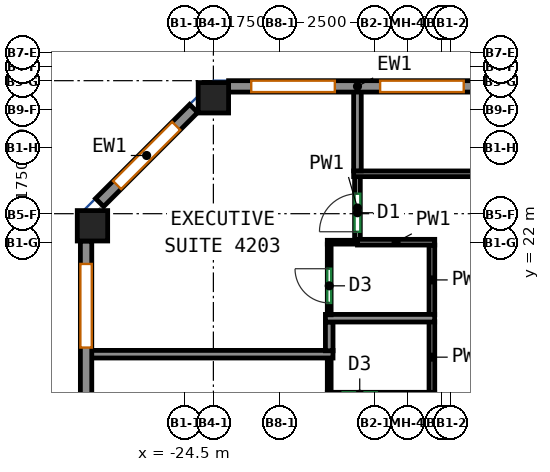
"""IFC4 building model, lengths in metres.
Left out: names, types, materials, properties, quantities, classifications, styles, units other than length and angle.
Written with IfcOpenShell. Run it as: python <this file> out.ifc"""

import sys

from ifc_helpers import new_model, si_unit, direction, frame, frame_2d, origin, origin_2d, place, context, subcontext, project, spatial, rectangle, extrude, source, transform, mapped, element, fill, save


model = new_model("IFC4")
c1 = context("Model", 3, precision=1e-05, world=origin(), true_north=direction((0.0, 1.0)))
c2 = subcontext(c1, "Body", "Model", "MODEL_VIEW")
j1 = project(units=[si_unit("LENGTHUNIT", "METRE"), si_unit("PLANEANGLEUNIT", "RADIAN")], contexts=[c1])
p1 = place(None, origin())
s1 = spatial("IfcSite", under=j1, at=p1, CompositionType="ELEMENT")
p2 = place(p1, origin())
s2 = spatial("IfcBuilding", under=s1, at=p2, CompositionType="ELEMENT")
p3 = place(p2, frame((0.0, 0.0, 178.7)))
s3 = spatial("IfcBuildingStorey", under=s2, at=p3, CompositionType="ELEMENT", Elevation=178.7)
m1 = source(origin(), c2, "Body", "SweptSolid", [
    extrude(rectangle(XDim=0.8, YDim=0.8, at=origin_2d()), origin(), (0.0, 0.0, 1.0), 3.12),
])
for number, where, z_axis, x_axis in (
    (1, (-26.932, 22.432, 0.0), (0.0, 0.0, 1.0), (1.0, 0.0, 0.0)),
    (2, (-23.75, 25.8, 0.0), (0.0, 0.0, 1.0), (1.0, 0.0, 0.0)),
):
    element("IfcColumn", number, at=place(p3, frame(where, z_axis=z_axis, x_axis=x_axis)), inside=s3, PredefinedType="COLUMN", context=c2, shape_type="MappedRepresentation", body=[
        mapped(m1, transform((0.0, 0.0, 0.0))),
    ])
m2 = source(origin(), c2, "Body", "SweptSolid", [
    extrude(rectangle(XDim=6.783, YDim=0.3, at=frame_2d((3.392, 0.0))), origin(), (0.0, 0.0, 1.0), 3.12),
])
p4 = place(p3, frame((-16.567, 26.1, 0.0), z_axis=(0.0, 0.0, 1.0), x_axis=(-1.0, 0.0, 0.0)))
e3 = element("IfcWall", 3, at=p4, inside=s3, PredefinedType="SOLIDWALL", context=c2, shape_type="MappedRepresentation", body=[
    mapped(m2, transform((0.0, 0.0, 0.0))),
])
p5 = place(p4, frame((0.596, 0.0, 0.85)))
e4 = element("IfcOpeningElement", 4, at=p5, cuts=e3, PredefinedType="OPENING", context=c2, shape_type="SweptSolid", body=[
    extrude(rectangle(XDim=2.2, YDim=1.95, at=frame_2d((1.1, 0.975))), frame((0.0, 0.16, 0.0), z_axis=(0.0, -1.0, 0.0), x_axis=(1.0, 0.0, 0.0)), (0.0, 0.0, 1.0), 0.32),
])
p6 = place(p4, frame((3.988, 0.0, 0.85)))
e5 = element("IfcOpeningElement", 5, at=p6, cuts=e3, PredefinedType="OPENING", context=c2, shape_type="SweptSolid", body=[
    extrude(rectangle(XDim=2.2, YDim=1.95, at=frame_2d((1.1, 0.975))), frame((0.0, 0.16, 0.0), z_axis=(0.0, -1.0, 0.0), x_axis=(1.0, 0.0, 0.0)), (0.0, 0.0, 1.0), 0.32),
])
m3 = source(origin(), c2, "Body", "SweptSolid", [
    extrude(rectangle(XDim=3.5, YDim=0.3, at=frame_2d((1.75, 0.0))), origin(), (0.0, 0.0, 1.0), 3.12),
])
p7 = place(p3, frame((-24.269, 25.519, 0.0), z_axis=(0.0, 0.0, 1.0), x_axis=(-0.707141656123, -0.70707190453, 0.0)))
e6 = element("IfcWall", 6, at=p7, inside=s3, PredefinedType="SOLIDWALL", context=c2, shape_type="MappedRepresentation", body=[
    mapped(m3, transform((0.0, 0.0, 0.0))),
])
p8 = place(p7, frame((0.65, 0.0, 0.85)))
e7 = element("IfcOpeningElement", 7, at=p8, cuts=e6, PredefinedType="OPENING", context=c2, shape_type="SweptSolid", body=[
    extrude(rectangle(XDim=2.2, YDim=1.95, at=frame_2d((1.1, 0.975))), frame((0.0, 0.16, 0.0), z_axis=(0.0, -1.0, 0.0), x_axis=(1.0, 0.0, 0.0)), (0.0, 0.0, 1.0), 0.32),
])
m4 = source(origin(), c2, "Body", "SweptSolid", [
    extrude(rectangle(XDim=13.632, YDim=0.3, at=frame_2d((6.816, 0.0))), origin(), (0.0, 0.0, 1.0), 3.12),
])
p9 = place(p3, frame((-27.1, 22.032, 0.0), z_axis=(0.0, 0.0, 1.0), x_axis=(0.0, -1.0, 0.0)))
e8 = element("IfcWall", 8, at=p9, inside=s3, PredefinedType="SOLIDWALL", context=c2, shape_type="MappedRepresentation", body=[
    mapped(m4, transform((0.0, 0.0, 0.0))),
])
p10 = place(p9, frame((0.604, 0.0, 0.85)))
e9 = element("IfcOpeningElement", 9, at=p10, cuts=e8, PredefinedType="OPENING", context=c2, shape_type="SweptSolid", body=[
    extrude(rectangle(XDim=2.2, YDim=1.95, at=frame_2d((1.1, 0.975))), frame((0.0, 0.16, 0.0), z_axis=(0.0, -1.0, 0.0), x_axis=(1.0, 0.0, 0.0)), (0.0, 0.0, 1.0), 0.32),
])
p11 = place(p9, frame((4.012, 0.0, 0.85)))
e10 = element("IfcOpeningElement", 10, at=p11, cuts=e8, PredefinedType="OPENING", context=c2, shape_type="SweptSolid", body=[
    extrude(rectangle(XDim=2.2, YDim=1.95, at=frame_2d((1.1, 0.975))), frame((0.0, 0.16, 0.0), z_axis=(0.0, -1.0, 0.0), x_axis=(1.0, 0.0, 0.0)), (0.0, 0.0, 1.0), 0.32),
])
p12 = place(p9, frame((7.42, 0.0, 0.85)))
e11 = element("IfcOpeningElement", 11, at=p12, cuts=e8, PredefinedType="OPENING", context=c2, shape_type="SweptSolid", body=[
    extrude(rectangle(XDim=2.2, YDim=1.95, at=frame_2d((1.1, 0.975))), frame((0.0, 0.16, 0.0), z_axis=(0.0, -1.0, 0.0), x_axis=(1.0, 0.0, 0.0)), (0.0, 0.0, 1.0), 0.32),
])
p13 = place(p9, frame((10.828, 0.0, 0.85)))
e12 = element("IfcOpeningElement", 12, at=p13, cuts=e8, PredefinedType="OPENING", context=c2, shape_type="SweptSolid", body=[
    extrude(rectangle(XDim=2.2, YDim=1.95, at=frame_2d((1.1, 0.975))), frame((0.0, 0.16, 0.0), z_axis=(0.0, -1.0, 0.0), x_axis=(1.0, 0.0, 0.0)), (0.0, 0.0, 1.0), 0.32),
])
p14 = place(p3, frame((-18.0, 18.04, 0.0), z_axis=(0.0, 0.0, 1.0), x_axis=(0.0, 1.0, 0.0)))
e13 = element("IfcWall", 13, at=p14, inside=s3, PredefinedType="PARTITIONING", context=c2, shape_type="SweptSolid", body=[
    extrude(rectangle(XDim=1.87, YDim=0.15, at=frame_2d((0.935, 0.0))), origin(), (0.0, 0.0, 1.0), 3.12),
])
p15 = place(p3, frame((-19.959, 22.075, 0.0), z_axis=(0.0, 0.0, 1.0), x_axis=(0.0, 1.0, 0.0)))
e14 = element("IfcWall", 14, at=p15, inside=s3, PredefinedType="PARTITIONING", context=c2, shape_type="SweptSolid", body=[
    extrude(rectangle(XDim=1.65, YDim=0.15, at=frame_2d((0.825, 0.0))), origin(), (0.0, 0.0, 1.0), 3.12),
])
p16 = place(p15, frame((0.2, 0.0, 0.0)))
e15 = element("IfcOpeningElement", 15, at=p16, cuts=e14, PredefinedType="OPENING", context=c2, shape_type="SweptSolid", body=[
    extrude(rectangle(XDim=1.0, YDim=2.1, at=frame_2d((0.5, 1.05))), frame((0.0, 0.085, 0.0), z_axis=(0.0, -1.0, 0.0), x_axis=(1.0, 0.0, 0.0)), (0.0, 0.0, 1.0), 0.17),
])
p17 = place(p3, frame((-18.0, 20.09, 0.0), z_axis=(0.0, 0.0, 1.0), x_axis=(0.0, 1.0, 0.0)))
e16 = element("IfcWall", 16, at=p17, inside=s3, PredefinedType="PARTITIONING", context=c2, shape_type="SweptSolid", body=[
    extrude(rectangle(XDim=1.835, YDim=0.15, at=frame_2d((0.917, 0.0))), origin(), (0.0, 0.0, 1.0), 3.12),
])
p18 = place(p3, frame((-19.959, 22.0, 0.0), z_axis=(0.0, 0.0, 1.0), x_axis=(1.0, 0.0, 0.0)))
e17 = element("IfcWall", 17, at=p18, inside=s3, PredefinedType="PARTITIONING", context=c2, shape_type="SweptSolid", body=[
    extrude(rectangle(XDim=2.034, YDim=0.15, at=frame_2d((1.017, 0.0))), origin(), (0.0, 0.0, 1.0), 3.12),
])
p19 = place(p3, frame((21.85, 23.8, 0.0), z_axis=(0.0, 0.0, 1.0), x_axis=(-1.0, 0.0, 0.0)))
e18 = element("IfcWall", 18, at=p19, inside=s3, PredefinedType="PARTITIONING", context=c2, shape_type="SweptSolid", body=[
    extrude(rectangle(XDim=41.909, YDim=0.15, at=frame_2d((20.955, 0.0))), origin(), (0.0, 0.0, 1.0), 3.12),
])
p20 = place(p19, frame((29.607, 0.0, 0.0)))
e19 = element("IfcOpeningElement", 19, at=p20, cuts=e18, PredefinedType="OPENING", context=c2, shape_type="SweptSolid", body=[
    extrude(rectangle(XDim=1.0, YDim=2.1, at=frame_2d((0.5, 1.05))), frame((0.0, 0.085, 0.0), z_axis=(0.0, -1.0, 0.0), x_axis=(1.0, 0.0, 0.0)), (0.0, 0.0, 1.0), 0.17),
])
p21 = place(p3, frame((-20.702, 18.05, 0.0), z_axis=(0.0, 0.0, 1.0), x_axis=(0.0, 1.0, 0.0)))
e20 = element("IfcWall", 20, at=p21, inside=s3, PredefinedType="PARTITIONING", context=c2, shape_type="SweptSolid", body=[
    extrude(rectangle(XDim=0.903, YDim=0.1, at=frame_2d((0.451, 0.0))), origin(), (0.0, 0.0, 1.0), 3.12),
])
p22 = place(p3, frame((-20.602, 19.053, 0.0), z_axis=(0.0, 0.0, 1.0), x_axis=(-1.0, 0.0, 0.0)))
e21 = element("IfcWall", 21, at=p22, inside=s3, PredefinedType="PARTITIONING", context=c2, shape_type="SweptSolid", body=[
    extrude(rectangle(XDim=6.398, YDim=0.2, at=frame_2d((3.199, 0.0))), origin(), (0.0, 0.0, 1.0), 3.12),
])
p23 = place(p3, frame((-20.702, 19.9, 0.0), z_axis=(0.0, 0.0, 1.0), x_axis=(0.0, -1.0, 0.0)))
e22 = element("IfcWall", 22, at=p23, inside=s3, PredefinedType="PARTITIONING", context=c2, shape_type="SweptSolid", body=[
    extrude(rectangle(XDim=0.757, YDim=0.2, at=frame_2d((0.378, 0.0))), origin(), (0.0, 0.0, 1.0), 3.12),
])
p24 = place(p3, frame((-17.927, 20.0, 0.0), z_axis=(0.0, 0.0, 1.0), x_axis=(-1.0, 0.0, 0.0)))
e23 = element("IfcWall", 23, at=p24, inside=s3, PredefinedType="PARTITIONING", context=c2, shape_type="SweptSolid", body=[
    extrude(rectangle(XDim=2.875, YDim=0.2, at=frame_2d((1.438, 0.0))), origin(), (0.0, 0.0, 1.0), 3.12),
])
p25 = place(p3, frame((-20.752, 22.0, 0.0), z_axis=(0.0, 0.0, 1.0), x_axis=(1.0, 0.0, 0.0)))
e24 = element("IfcWall", 24, at=p25, inside=s3, PredefinedType="PARTITIONING", context=c2, shape_type="SweptSolid", body=[
    extrude(rectangle(XDim=0.791, YDim=0.1, at=frame_2d((0.396, 0.0))), origin(), (0.0, 0.0, 1.0), 3.12),
])
p26 = place(p3, frame((-20.702, 20.09, 0.0), z_axis=(0.0, 0.0, 1.0), x_axis=(0.0, 1.0, 0.0)))
e25 = element("IfcWall", 25, at=p26, inside=s3, PredefinedType="PARTITIONING", context=c2, shape_type="SweptSolid", body=[
    extrude(rectangle(XDim=1.86, YDim=0.1, at=frame_2d((0.93, 0.0))), origin(), (0.0, 0.0, 1.0), 3.12),
])
p27 = place(p26, frame((0.312, 0.0, 0.0)))
e26 = element("IfcOpeningElement", 26, at=p27, cuts=e25, PredefinedType="OPENING", context=c2, shape_type="SweptSolid", body=[
    extrude(rectangle(XDim=0.9, YDim=2.1, at=frame_2d((0.45, 1.05))), frame((0.0, 0.06, 0.0), z_axis=(0.0, -1.0, 0.0), x_axis=(1.0, 0.0, 0.0)), (0.0, 0.0, 1.0), 0.12),
])
p28 = place(p3, frame((-19.959, 23.877, 0.0), z_axis=(0.0, 0.0, 1.0), x_axis=(0.0, 1.0, 0.0)))
e27 = element("IfcWall", 27, at=p28, inside=s3, PredefinedType="PARTITIONING", context=c2, shape_type="SweptSolid", body=[
    extrude(rectangle(XDim=2.123, YDim=0.2, at=frame_2d((1.062, 0.0))), origin(), (0.0, 0.0, 1.0), 3.12),
])
p29 = place(p5, origin())
e28 = element("IfcWindow", 28, at=p29, inside=s3, PartitioningType="SINGLE_PANEL", PredefinedType="WINDOW", context=c2, shape_type="SweptSolid", body=[
    extrude(rectangle(XDim=2.2, YDim=1.95, at=frame_2d((1.1, 0.975))), frame((0.0, 0.03, 0.0), z_axis=(0.0, -1.0, 0.0), x_axis=(1.0, 0.0, 0.0)), (0.0, 0.0, 1.0), 0.06),
])
fill(e4, e28)
p30 = place(p6, origin())
e29 = element("IfcWindow", 29, at=p30, inside=s3, PartitioningType="SINGLE_PANEL", PredefinedType="WINDOW", context=c2, shape_type="SweptSolid", body=[
    extrude(rectangle(XDim=2.2, YDim=1.95, at=frame_2d((1.1, 0.975))), frame((0.0, 0.03, 0.0), z_axis=(0.0, -1.0, 0.0), x_axis=(1.0, 0.0, 0.0)), (0.0, 0.0, 1.0), 0.06),
])
fill(e5, e29)
p31 = place(p8, origin())
e30 = element("IfcWindow", 30, at=p31, inside=s3, PartitioningType="SINGLE_PANEL", PredefinedType="WINDOW", context=c2, shape_type="SweptSolid", body=[
    extrude(rectangle(XDim=2.2, YDim=1.95, at=frame_2d((1.1, 0.975))), frame((0.0, 0.03, 0.0), z_axis=(0.0, -1.0, 0.0), x_axis=(1.0, 0.0, 0.0)), (0.0, 0.0, 1.0), 0.06),
])
fill(e7, e30)
p32 = place(p10, origin())
e31 = element("IfcWindow", 31, at=p32, inside=s3, PartitioningType="SINGLE_PANEL", PredefinedType="WINDOW", context=c2, shape_type="SweptSolid", body=[
    extrude(rectangle(XDim=2.2, YDim=1.95, at=frame_2d((1.1, 0.975))), frame((0.0, 0.03, 0.0), z_axis=(0.0, -1.0, 0.0), x_axis=(1.0, 0.0, 0.0)), (0.0, 0.0, 1.0), 0.06),
])
fill(e9, e31)
p33 = place(p27, origin())
e32 = element("IfcDoor", 32, at=p33, inside=s3, OperationType="SINGLE_SWING_RIGHT", PredefinedType="DOOR", context=c2, shape_type="SweptSolid", body=[
    extrude(rectangle(XDim=0.9, YDim=2.1, at=frame_2d((0.45, 1.05))), frame((0.0, 0.025, 0.0), z_axis=(0.0, -1.0, 0.0), x_axis=(1.0, 0.0, 0.0)), (0.0, 0.0, 1.0), 0.05),
])
fill(e26, e32)
p34 = place(p16, origin())
e33 = element("IfcDoor", 33, at=p34, inside=s3, OperationType="SINGLE_SWING_LEFT", PredefinedType="DOOR", context=c2, shape_type="SweptSolid", body=[
    extrude(rectangle(XDim=1.0, YDim=2.1, at=frame_2d((0.5, 1.05))), frame((0.0, 0.025, 0.0), z_axis=(0.0, -1.0, 0.0), x_axis=(1.0, 0.0, 0.0)), (0.0, 0.0, 1.0), 0.05),
])
fill(e15, e33)
save(model, sys.argv[1])
